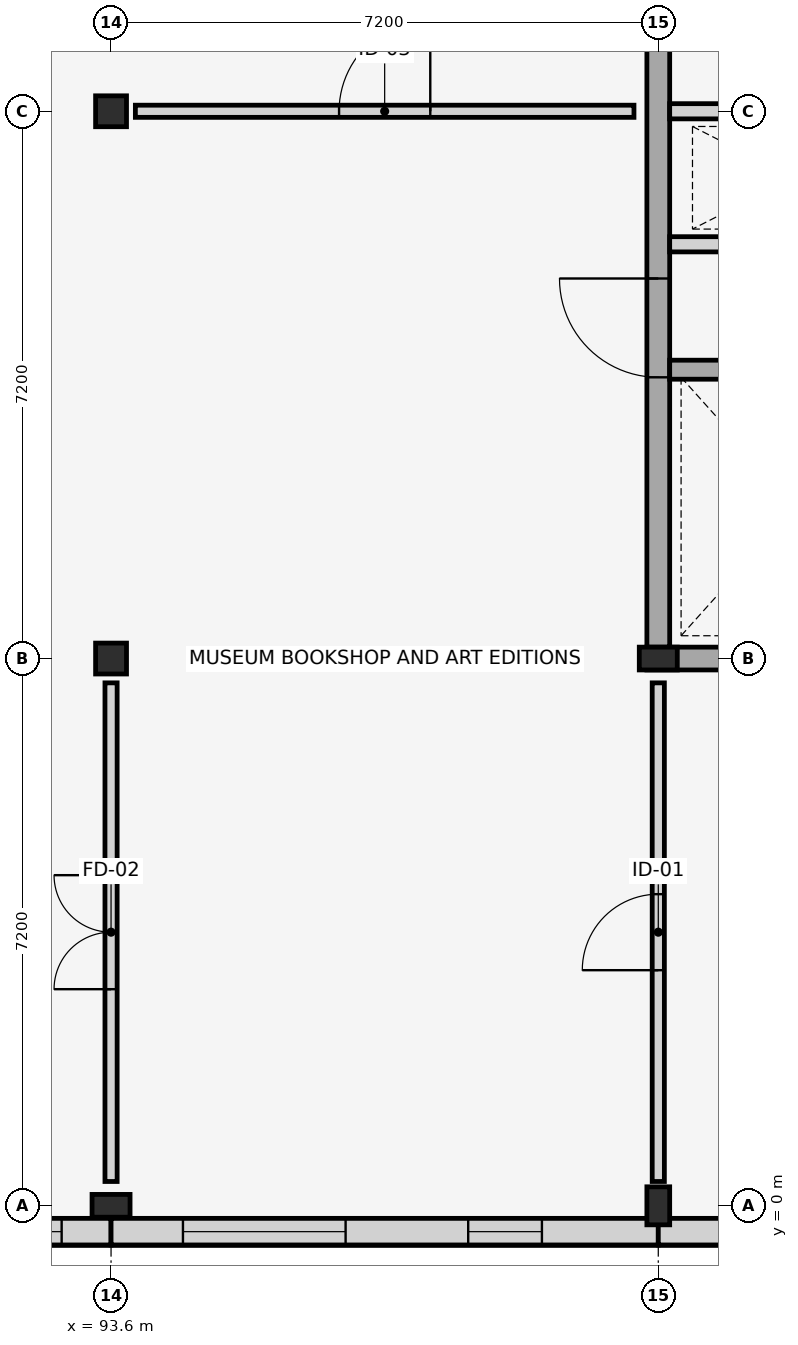
"""IFC4 building model, lengths in metres.
Left out: names, types, materials, properties, quantities, classifications, styles, units other than length and angle.
Written with IfcOpenShell. Run it as: python <this file> out.ifc"""

import sys

from ifc_helpers import new_model, si_unit, direction, frame, frame_2d, origin, origin_2d, place, context, subcontext, project, spatial, rectangle, hollow_circle, i_section, extrude, element, fill, save


model = new_model("IFC4")
c1 = context("Model", 3, precision=1e-05, world=origin(), true_north=direction((0.0, 1.0)))
c2 = subcontext(c1, "Body", "Model", "MODEL_VIEW")
j1 = project(units=[si_unit("LENGTHUNIT", "METRE"), si_unit("PLANEANGLEUNIT", "RADIAN")], contexts=[c1])
p1 = place(None, origin())
s1 = spatial("IfcSite", under=j1, at=p1, CompositionType="ELEMENT")
p2 = place(p1, origin())
s2 = spatial("IfcBuilding", under=s1, at=p2, CompositionType="ELEMENT")
p3 = place(p2, origin())
s3 = spatial("IfcBuildingStorey", under=s2, at=p3, CompositionType="ELEMENT", Elevation=0.0)
p4 = place(p3, frame((93.6, 0.0, 0.0), z_axis=(0.0, 0.0, 1.0), x_axis=(0.0, 1.0, 0.0)))
e1 = element("IfcColumn", 1, at=p4, inside=s3, PredefinedType="COLUMN", context=c2, shape_type="SweptSolid", body=[
    extrude(i_section(OverallWidth=0.3, OverallDepth=0.5, WebThickness=0.014, FlangeThickness=0.028, FilletRadius=0.027, at=origin_2d()), origin(), (0.0, 0.0, 1.0), 4.5),
])
for number, where, z_axis, x_axis in (
    (2, (93.6, 7.2, 0.0), (0.0, 0.0, 1.0), (1.0, 0.0, 0.0)),
    (3, (93.6, 14.4, 0.0), (0.0, 0.0, 1.0), (0.0, 1.0, 0.0)),
):
    element("IfcColumn", number, at=place(p3, frame(where, z_axis=z_axis, x_axis=x_axis)), inside=s3, PredefinedType="COLUMN", context=c2, shape_type="SweptSolid", body=[
        extrude(hollow_circle(Radius=0.203, WallThickness=0.016, at=origin_2d()), origin(), (0.0, 0.0, 1.0), 4.5),
    ])
for number, where, z_axis, x_axis in (
    (4, (100.8, 0.0, 0.0), (0.0, 0.0, 1.0), (1.0, 0.0, 0.0)),
    (5, (100.8, 7.2, 0.0), (0.0, 0.0, 1.0), (0.0, 1.0, 0.0)),
):
    element("IfcColumn", number, at=place(p3, frame(where, z_axis=z_axis, x_axis=x_axis)), inside=s3, PredefinedType="COLUMN", context=c2, shape_type="SweptSolid", body=[
        extrude(i_section(OverallWidth=0.3, OverallDepth=0.5, WebThickness=0.014, FlangeThickness=0.028, FilletRadius=0.027, at=origin_2d()), origin(), (0.0, 0.0, 1.0), 4.5),
    ])
p5 = place(p3, frame((86.4, -0.34, 0.0), z_axis=(0.0, 0.0, 1.0), x_axis=(1.0, 0.0, 0.0)))
e6 = element("IfcWall", 6, at=p5, inside=s3, PredefinedType="STANDARD", context=c2, shape_type="SweptSolid", body=[
    extrude(rectangle(XDim=7.2, YDim=0.35, at=frame_2d((3.6, 0.0))), origin(), (0.0, 0.0, 1.0), 4.5),
])
p6 = place(p5, frame((2.5, 0.0, 0.0)))
e7 = element("IfcOpeningElement", 7, at=p6, cuts=e6, PredefinedType="OPENING", context=c2, shape_type="SweptSolid", body=[
    extrude(rectangle(XDim=2.2, YDim=2.55, at=frame_2d((1.1, 1.275))), frame((0.0, 0.185, 0.0), z_axis=(0.0, -1.0, 0.0), x_axis=(1.0, 0.0, 0.0)), (0.0, 0.0, 1.0), 0.37),
])
p7 = place(p5, frame((2.4, 0.0, 2.7)))
e8 = element("IfcOpeningElement", 8, at=p7, cuts=e6, PredefinedType="OPENING", context=c2, shape_type="SweptSolid", body=[
    extrude(rectangle(XDim=2.4, YDim=1.25, at=frame_2d((1.2, 0.625))), frame((0.0, 0.185, 0.0), z_axis=(0.0, -1.0, 0.0), x_axis=(1.0, 0.0, 0.0)), (0.0, 0.0, 1.0), 0.37),
])
p8 = place(p5, frame((0.65, 0.0, 0.35)))
e9 = element("IfcOpeningElement", 9, at=p8, cuts=e6, PredefinedType="OPENING", context=c2, shape_type="SweptSolid", body=[
    extrude(rectangle(XDim=1.1, YDim=2.0, at=frame_2d((0.55, 1.0))), frame((0.0, 0.185, 0.0), z_axis=(0.0, -1.0, 0.0), x_axis=(1.0, 0.0, 0.0)), (0.0, 0.0, 1.0), 0.37),
])
p9 = place(p5, frame((5.45, 0.0, 0.35)))
e10 = element("IfcOpeningElement", 10, at=p9, cuts=e6, PredefinedType="OPENING", context=c2, shape_type="SweptSolid", body=[
    extrude(rectangle(XDim=1.1, YDim=2.0, at=frame_2d((0.55, 1.0))), frame((0.0, 0.185, 0.0), z_axis=(0.0, -1.0, 0.0), x_axis=(1.0, 0.0, 0.0)), (0.0, 0.0, 1.0), 0.37),
])
p10 = place(p3, frame((93.6, -0.34, 0.0), z_axis=(0.0, 0.0, 1.0), x_axis=(1.0, 0.0, 0.0)))
e11 = element("IfcWall", 11, at=p10, inside=s3, PredefinedType="STANDARD", context=c2, shape_type="SweptSolid", body=[
    extrude(rectangle(XDim=7.2, YDim=0.35, at=frame_2d((3.6, 0.0))), origin(), (0.0, 0.0, 1.0), 4.5),
])
p11 = place(p10, frame((0.946, 0.0, 0.9)))
e12 = element("IfcOpeningElement", 12, at=p11, cuts=e11, PredefinedType="OPENING", context=c2, shape_type="SweptSolid", body=[
    extrude(rectangle(XDim=2.14, YDim=1.82, at=frame_2d((1.07, 0.91))), frame((0.0, 0.185, 0.0), z_axis=(0.0, -1.0, 0.0), x_axis=(1.0, 0.0, 0.0)), (0.0, 0.0, 1.0), 0.37),
])
p12 = place(p10, frame((4.699, 0.0, 0.9)))
e13 = element("IfcOpeningElement", 13, at=p12, cuts=e11, PredefinedType="OPENING", context=c2, shape_type="SweptSolid", body=[
    extrude(rectangle(XDim=0.97, YDim=1.96, at=frame_2d((0.485, 0.98))), frame((0.0, 0.185, 0.0), z_axis=(0.0, -1.0, 0.0), x_axis=(1.0, 0.0, 0.0)), (0.0, 0.0, 1.0), 0.37),
])
p13 = place(p3, frame((100.8, -0.34, 0.0), z_axis=(0.0, 0.0, 1.0), x_axis=(1.0, 0.0, 0.0)))
e14 = element("IfcWall", 14, at=p13, inside=s3, PredefinedType="STANDARD", context=c2, shape_type="SweptSolid", body=[
    extrude(rectangle(XDim=7.365, YDim=0.35, at=frame_2d((3.683, 0.0))), origin(), (0.0, 0.0, 1.0), 4.5),
])
p14 = place(p13, frame((1.411, 0.0, 0.9)))
e15 = element("IfcOpeningElement", 15, at=p14, cuts=e14, PredefinedType="OPENING", context=c2, shape_type="SweptSolid", body=[
    extrude(rectangle(XDim=1.21, YDim=1.96, at=frame_2d((0.605, 0.98))), frame((0.0, 0.185, 0.0), z_axis=(0.0, -1.0, 0.0), x_axis=(1.0, 0.0, 0.0)), (0.0, 0.0, 1.0), 0.37),
])
p15 = place(p13, frame((4.459, 0.0, 0.9)))
e16 = element("IfcOpeningElement", 16, at=p15, cuts=e14, PredefinedType="OPENING", context=c2, shape_type="SweptSolid", body=[
    extrude(rectangle(XDim=1.45, YDim=1.96, at=frame_2d((0.725, 0.98))), frame((0.0, 0.185, 0.0), z_axis=(0.0, -1.0, 0.0), x_axis=(1.0, 0.0, 0.0)), (0.0, 0.0, 1.0), 0.37),
])
p16 = place(p3, frame((100.65, 7.2, 0.0), z_axis=(0.0, 0.0, 1.0), x_axis=(1.0, 0.0, 0.0)))
e17 = element("IfcWall", 17, at=p16, inside=s3, PredefinedType="SHEAR", context=c2, shape_type="SweptSolid", body=[
    extrude(rectangle(XDim=7.35, YDim=0.3, at=frame_2d((3.675, 0.0))), origin(), (0.0, 0.0, 1.0), 4.28),
])
p17 = place(p3, frame((100.8, 7.35, 0.0), z_axis=(0.0, 0.0, 1.0), x_axis=(0.0, 1.0, 0.0)))
e18 = element("IfcWall", 18, at=p17, inside=s3, PredefinedType="SHEAR", context=c2, shape_type="SweptSolid", body=[
    extrude(rectangle(XDim=14.1, YDim=0.3, at=frame_2d((7.05, 0.0))), origin(), (0.0, 0.0, 1.0), 4.28),
])
p18 = place(p17, frame((3.55, 0.0, 0.0)))
e19 = element("IfcOpeningElement", 19, at=p18, cuts=e18, PredefinedType="OPENING", context=c2, shape_type="SweptSolid", body=[
    extrude(rectangle(XDim=1.3, YDim=2.2, at=frame_2d((0.65, 1.1))), frame((0.0, 0.16, 0.0), z_axis=(0.0, -1.0, 0.0), x_axis=(1.0, 0.0, 0.0)), (0.0, 0.0, 1.0), 0.32),
])
p19 = place(p17, frame((7.85, 0.0, 0.0)))
e20 = element("IfcOpeningElement", 20, at=p19, cuts=e18, PredefinedType="OPENING", context=c2, shape_type="SweptSolid", body=[
    extrude(rectangle(XDim=1.05, YDim=2.15, at=frame_2d((0.525, 1.075))), frame((0.0, 0.16, 0.0), z_axis=(0.0, -1.0, 0.0), x_axis=(1.0, 0.0, 0.0)), (0.0, 0.0, 1.0), 0.32),
])
p20 = place(p17, frame((10.55, 0.0, 0.0)))
e21 = element("IfcOpeningElement", 21, at=p20, cuts=e18, PredefinedType="OPENING", context=c2, shape_type="SweptSolid", body=[
    extrude(rectangle(XDim=1.0, YDim=2.15, at=frame_2d((0.5, 1.075))), frame((0.0, 0.16, 0.0), z_axis=(0.0, -1.0, 0.0), x_axis=(1.0, 0.0, 0.0)), (0.0, 0.0, 1.0), 0.32),
])
p21 = place(p3, frame((100.95, 12.65, 0.0), z_axis=(0.0, 0.0, 1.0), x_axis=(1.0, 0.0, 0.0)))
e22 = element("IfcWall", 22, at=p21, inside=s3, PredefinedType="PLUMBINGWALL", context=c2, shape_type="SweptSolid", body=[
    extrude(rectangle(XDim=3.55, YDim=0.2, at=frame_2d((1.775, 0.0))), origin(), (0.0, 0.0, 1.0), 3.7),
])
p22 = place(p21, frame((0.9, 0.0, 0.0)))
e23 = element("IfcOpeningElement", 23, at=p22, cuts=e22, PredefinedType="OPENING", context=c2, shape_type="SweptSolid", body=[
    extrude(rectangle(XDim=0.85, YDim=2.05, at=frame_2d((0.425, 1.025))), frame((0.0, 0.11, 0.0), z_axis=(0.0, -1.0, 0.0), x_axis=(1.0, 0.0, 0.0)), (0.0, 0.0, 1.0), 0.22),
])
p23 = place(p3, frame((100.95, 11.0, 0.0), z_axis=(0.0, 0.0, 1.0), x_axis=(1.0, 0.0, 0.0)))
e24 = element("IfcWall", 24, at=p23, inside=s3, PredefinedType="SHEAR", context=c2, shape_type="SweptSolid", body=[
    extrude(rectangle(XDim=3.375, YDim=0.25, at=frame_2d((1.688, 0.0))), origin(), (0.0, 0.0, 1.0), 4.28),
])
p24 = place(p3, frame((100.95, 14.4, 0.0), z_axis=(0.0, 0.0, 1.0), x_axis=(1.0, 0.0, 0.0)))
e25 = element("IfcWall", 25, at=p24, inside=s3, PredefinedType="PLUMBINGWALL", context=c2, shape_type="SweptSolid", body=[
    extrude(rectangle(XDim=3.55, YDim=0.2, at=frame_2d((1.775, 0.0))), origin(), (0.0, 0.0, 1.0), 3.7),
])
p25 = place(p3, frame((93.6, 0.32, 0.0), z_axis=(0.0, 0.0, 1.0), x_axis=(0.0, 1.0, 0.0)))
e26 = element("IfcWall", 26, at=p25, inside=s3, PredefinedType="PARTITIONING", context=c2, shape_type="SweptSolid", body=[
    extrude(rectangle(XDim=6.56, YDim=0.16, at=frame_2d((3.28, 0.0))), origin(), (0.0, 0.0, 1.0), 3.45),
])
p26 = place(p25, frame((2.53, 0.0, 0.0)))
e27 = element("IfcOpeningElement", 27, at=p26, cuts=e26, PredefinedType="OPENING", context=c2, shape_type="SweptSolid", body=[
    extrude(rectangle(XDim=1.5, YDim=2.25, at=frame_2d((0.75, 1.125))), frame((0.0, 0.09, 0.0), z_axis=(0.0, -1.0, 0.0), x_axis=(1.0, 0.0, 0.0)), (0.0, 0.0, 1.0), 0.18),
])
p27 = place(p3, frame((100.8, 0.32, 0.0), z_axis=(0.0, 0.0, 1.0), x_axis=(0.0, 1.0, 0.0)))
e28 = element("IfcWall", 28, at=p27, inside=s3, PredefinedType="PARTITIONING", context=c2, shape_type="SweptSolid", body=[
    extrude(rectangle(XDim=6.56, YDim=0.16, at=frame_2d((3.28, 0.0))), origin(), (0.0, 0.0, 1.0), 3.45),
])
p28 = place(p27, frame((2.78, 0.0, 0.0)))
e29 = element("IfcOpeningElement", 29, at=p28, cuts=e28, PredefinedType="OPENING", context=c2, shape_type="SweptSolid", body=[
    extrude(rectangle(XDim=1.0, YDim=2.15, at=frame_2d((0.5, 1.075))), frame((0.0, 0.09, 0.0), z_axis=(0.0, -1.0, 0.0), x_axis=(1.0, 0.0, 0.0)), (0.0, 0.0, 1.0), 0.18),
])
p29 = place(p3, frame((93.92, 14.4, 0.0), z_axis=(0.0, 0.0, 1.0), x_axis=(1.0, 0.0, 0.0)))
e30 = element("IfcWall", 30, at=p29, inside=s3, PredefinedType="PARTITIONING", context=c2, shape_type="SweptSolid", body=[
    extrude(rectangle(XDim=6.56, YDim=0.16, at=frame_2d((3.28, 0.0))), origin(), (0.0, 0.0, 1.0), 3.45),
])
p30 = place(p29, frame((2.68, 0.0, 0.0)))
e31 = element("IfcOpeningElement", 31, at=p30, cuts=e30, PredefinedType="OPENING", context=c2, shape_type="SweptSolid", body=[
    extrude(rectangle(XDim=1.2, YDim=2.25, at=frame_2d((0.6, 1.125))), frame((0.0, 0.09, 0.0), z_axis=(0.0, -1.0, 0.0), x_axis=(1.0, 0.0, 0.0)), (0.0, 0.0, 1.0), 0.18),
])
p31 = place(p9, origin())
e32 = element("IfcWindow", 32, at=p31, inside=s3, PartitioningType="SINGLE_PANEL", PredefinedType="WINDOW", context=c2, shape_type="SweptSolid", body=[
    extrude(rectangle(XDim=1.1, YDim=2.0, at=frame_2d((0.55, 1.0))), frame((0.0, 0.03, 0.0), z_axis=(0.0, -1.0, 0.0), x_axis=(1.0, 0.0, 0.0)), (0.0, 0.0, 1.0), 0.06),
])
fill(e10, e32)
p32 = place(p11, origin())
e33 = element("IfcWindow", 33, at=p32, inside=s3, PartitioningType="SINGLE_PANEL", PredefinedType="WINDOW", context=c2, shape_type="SweptSolid", body=[
    extrude(rectangle(XDim=2.14, YDim=1.82, at=frame_2d((1.07, 0.91))), frame((0.0, 0.03, 0.0), z_axis=(0.0, -1.0, 0.0), x_axis=(1.0, 0.0, 0.0)), (0.0, 0.0, 1.0), 0.06),
])
fill(e12, e33)
p33 = place(p12, origin())
e34 = element("IfcWindow", 34, at=p33, inside=s3, PartitioningType="SINGLE_PANEL", PredefinedType="WINDOW", context=c2, shape_type="SweptSolid", body=[
    extrude(rectangle(XDim=0.97, YDim=1.96, at=frame_2d((0.485, 0.98))), frame((0.0, 0.03, 0.0), z_axis=(0.0, -1.0, 0.0), x_axis=(1.0, 0.0, 0.0)), (0.0, 0.0, 1.0), 0.06),
])
fill(e13, e34)
p34 = place(p18, origin())
e35 = element("IfcDoor", 35, at=p34, inside=s3, OperationType="SINGLE_SWING_RIGHT", PredefinedType="DOOR", context=c2, shape_type="SweptSolid", body=[
    extrude(rectangle(XDim=1.3, YDim=2.2, at=frame_2d((0.65, 1.1))), frame((0.0, 0.025, 0.0), z_axis=(0.0, -1.0, 0.0), x_axis=(1.0, 0.0, 0.0)), (0.0, 0.0, 1.0), 0.05),
])
fill(e19, e35)
p35 = place(p26, origin())
e36 = element("IfcDoor", 36, at=p35, inside=s3, OperationType="DOUBLE_DOOR_SINGLE_SWING", PredefinedType="DOOR", context=c2, shape_type="SweptSolid", body=[
    extrude(rectangle(XDim=1.5, YDim=2.25, at=frame_2d((0.75, 1.125))), frame((0.0, 0.025, 0.0), z_axis=(0.0, -1.0, 0.0), x_axis=(1.0, 0.0, 0.0)), (0.0, 0.0, 1.0), 0.05),
])
fill(e27, e36)
p36 = place(p28, origin())
e37 = element("IfcDoor", 37, at=p36, inside=s3, OperationType="SINGLE_SWING_LEFT", PredefinedType="DOOR", context=c2, shape_type="SweptSolid", body=[
    extrude(rectangle(XDim=1.0, YDim=2.15, at=frame_2d((0.5, 1.075))), frame((0.0, 0.025, 0.0), z_axis=(0.0, -1.0, 0.0), x_axis=(1.0, 0.0, 0.0)), (0.0, 0.0, 1.0), 0.05),
])
fill(e29, e37)
p37 = place(p30, origin())
e38 = element("IfcDoor", 38, at=p37, inside=s3, OperationType="SINGLE_SWING_RIGHT", PredefinedType="DOOR", context=c2, shape_type="SweptSolid", body=[
    extrude(rectangle(XDim=1.2, YDim=2.25, at=frame_2d((0.6, 1.125))), frame((0.0, 0.025, 0.0), z_axis=(0.0, -1.0, 0.0), x_axis=(1.0, 0.0, 0.0)), (0.0, 0.0, 1.0), 0.05),
])
fill(e31, e38)
save(model, sys.argv[1])
